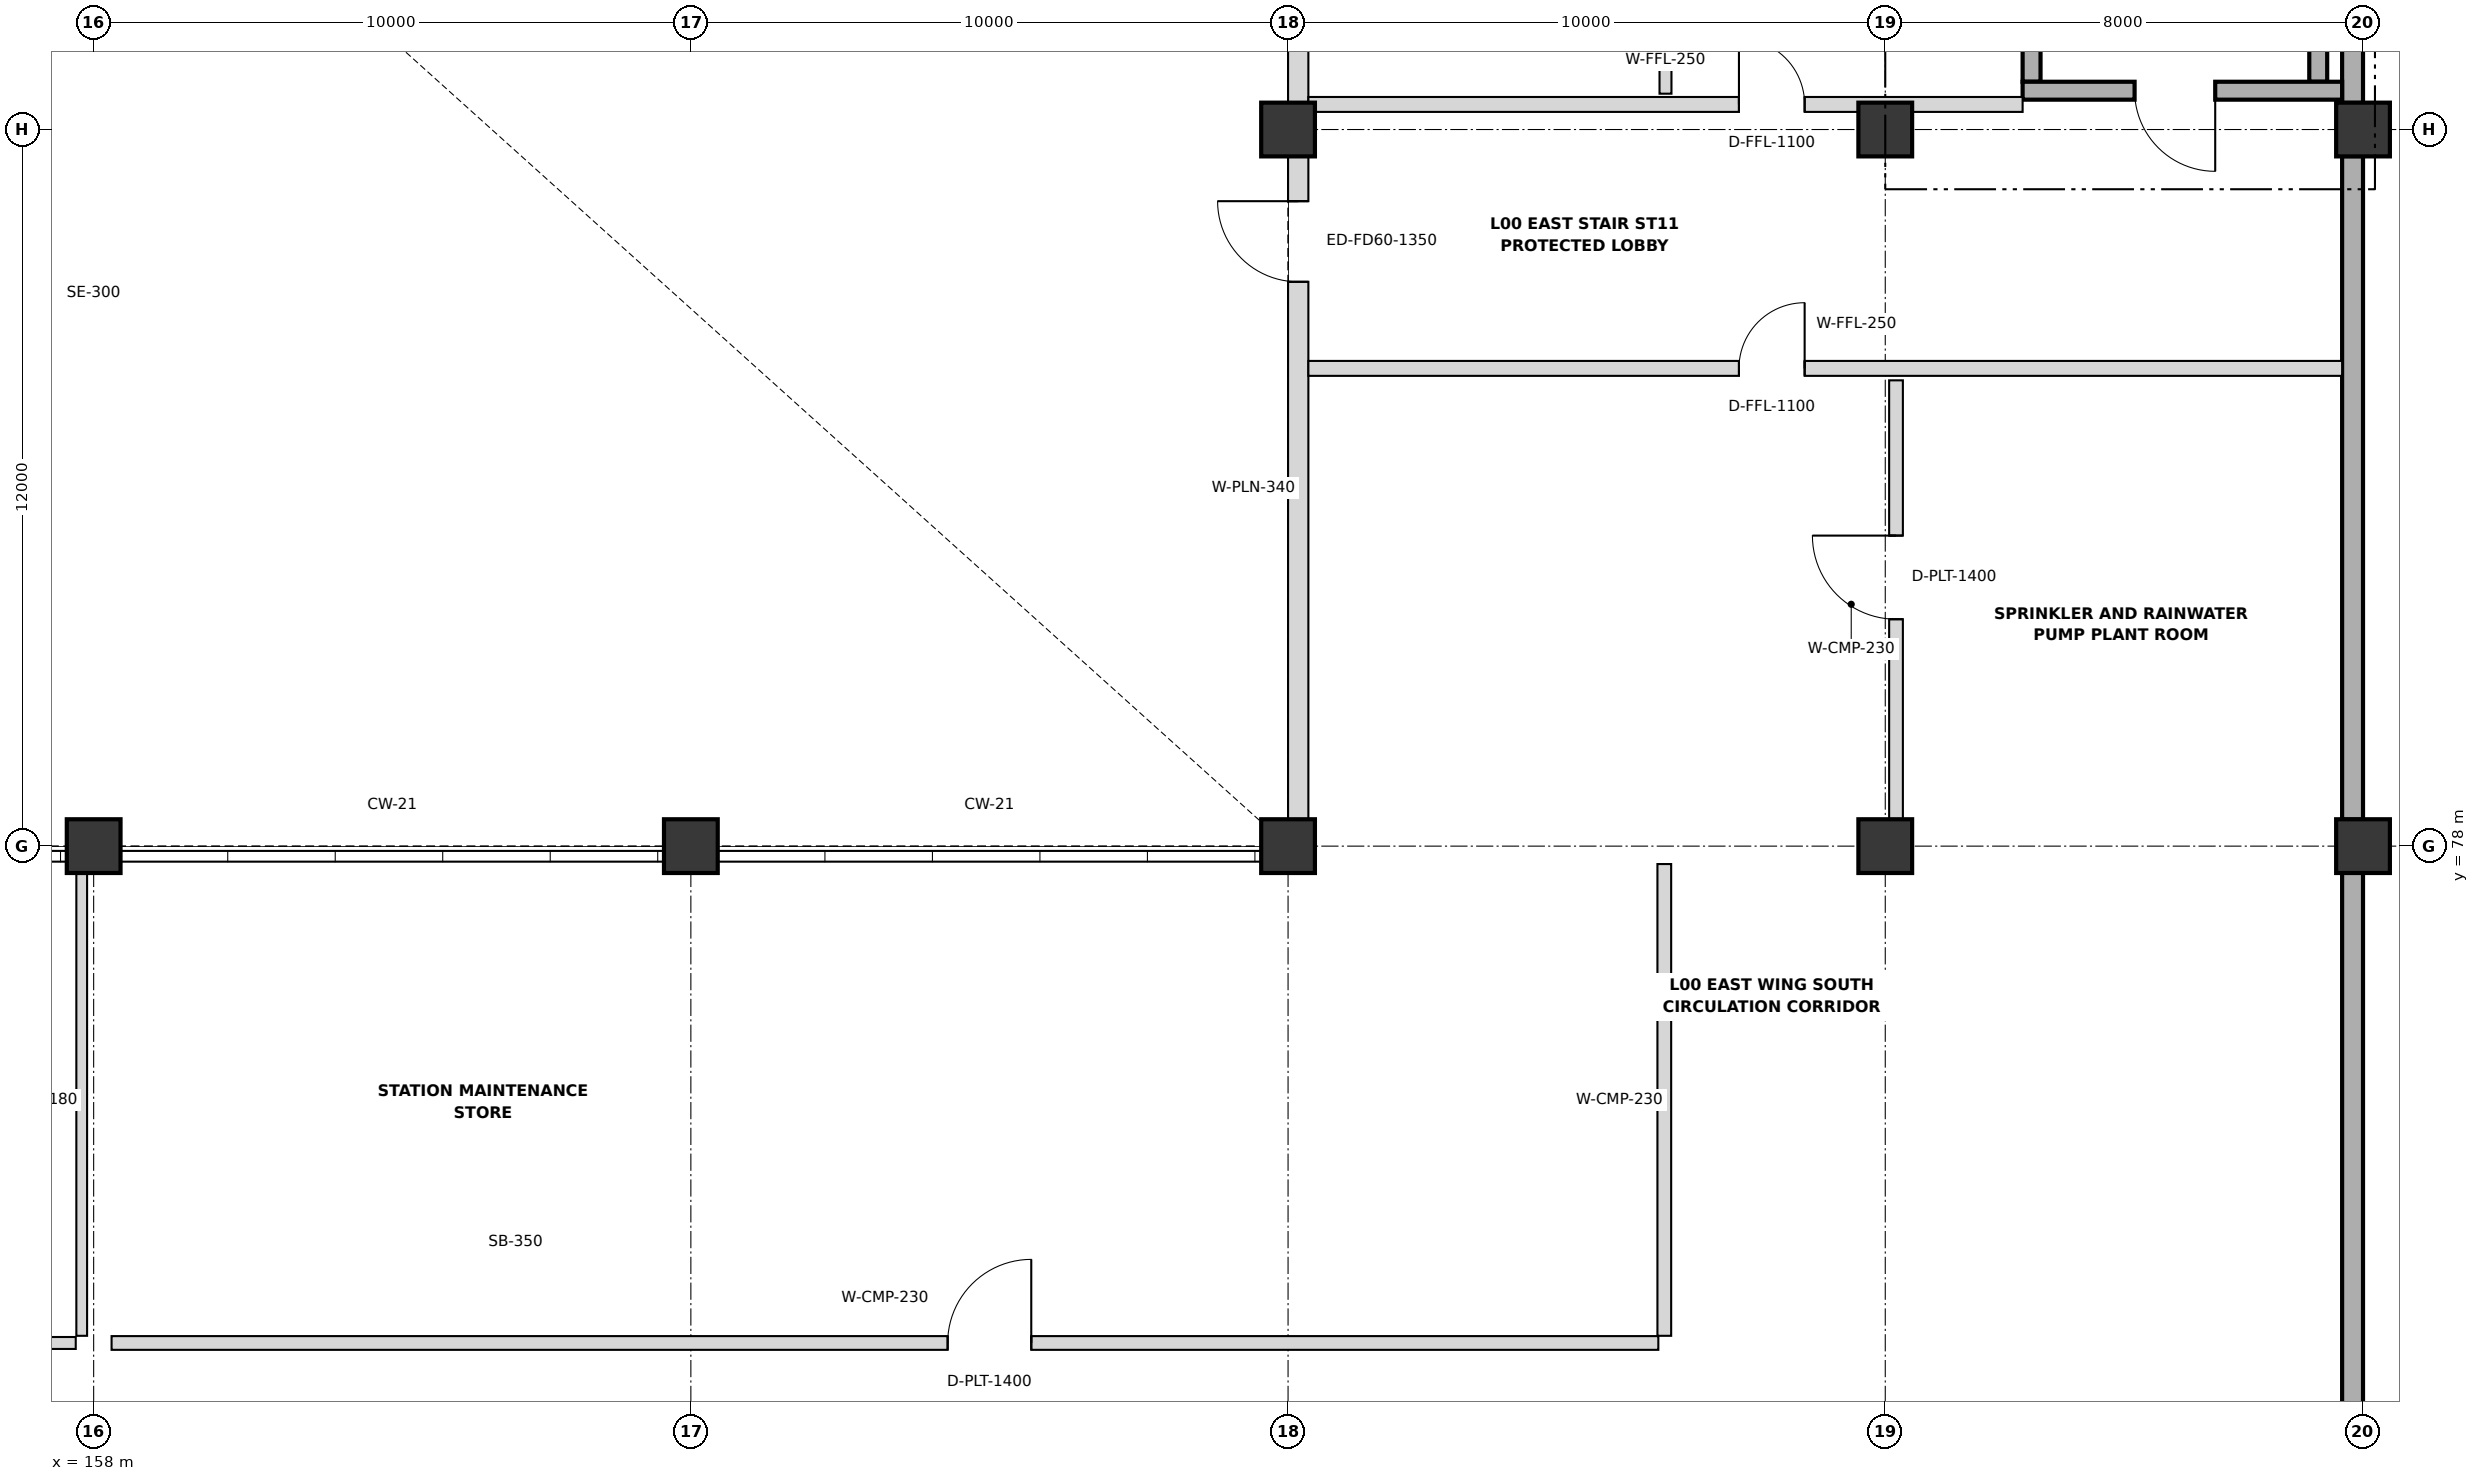
"""IFC4 building model, lengths in metres.
Left out: names, types, materials, properties, quantities, classifications, styles, units other than length and angle.
Written with IfcOpenShell. Run it as: python <this file> out.ifc"""

import sys

from ifc_helpers import new_model, si_unit, direction, frame, frame_2d, origin, origin_2d, place, context, subcontext, project, spatial, rectangle, extrude, element, fill, save


model = new_model("IFC4")
c1 = context("Model", 3, precision=1e-05, world=origin(), true_north=direction((0.0, 1.0)))
c2 = subcontext(c1, "Body", "Model", "MODEL_VIEW")
j1 = project(units=[si_unit("LENGTHUNIT", "METRE"), si_unit("PLANEANGLEUNIT", "RADIAN")], contexts=[c1])
p1 = place(None, origin())
s1 = spatial("IfcSite", under=j1, at=p1, CompositionType="ELEMENT")
p2 = place(p1, origin())
s2 = spatial("IfcBuilding", under=s1, at=p2, CompositionType="ELEMENT")
p3 = place(p2, origin())
s3 = spatial("IfcBuildingStorey", under=s2, at=p3, CompositionType="ELEMENT", Elevation=0.0)
for number, where, z_axis, x_axis in (
    (1, (158.0, 78.0, 0.0), (0.0, 0.0, 1.0), (1.0, 0.0, 0.0)),
    (2, (168.0, 78.0, 0.0), (0.0, 0.0, 1.0), (1.0, 0.0, 0.0)),
    (3, (178.0, 78.0, 0.0), (0.0, 0.0, 1.0), (1.0, 0.0, 0.0)),
    (4, (178.0, 90.0, 0.0), (0.0, 0.0, 1.0), (1.0, 0.0, 0.0)),
    (5, (188.0, 78.0, 0.0), (0.0, 0.0, 1.0), (1.0, 0.0, 0.0)),
    (6, (188.0, 90.0, 0.0), (0.0, 0.0, 1.0), (1.0, 0.0, 0.0)),
    (7, (196.0, 78.0, 0.0), (0.0, 0.0, 1.0), (1.0, 0.0, 0.0)),
    (8, (196.0, 90.0, 0.0), (0.0, 0.0, 1.0), (1.0, 0.0, 0.0)),
):
    element("IfcColumn", number, at=place(p3, frame(where, z_axis=z_axis, x_axis=x_axis)), inside=s3, PredefinedType="COLUMN", context=c2, shape_type="SweptSolid", body=[
        extrude(rectangle(XDim=0.9, YDim=0.9, at=origin_2d()), origin(), (0.0, 0.0, 1.0), 5.4),
    ])
for number, where, z_axis, x_axis in (
    (9, (195.825, 77.555, 0.0), (0.0, 0.0, 1.0), (0.0, -1.0, 0.0)),
    (10, (195.825, 89.555, 0.0), (0.0, 0.0, 1.0), (0.0, -1.0, 0.0)),
    (11, (195.825, 101.555, 0.0), (0.0, 0.0, 1.0), (0.0, -1.0, 0.0)),
):
    element("IfcWall", number, at=place(p3, frame(where, z_axis=z_axis, x_axis=x_axis)), inside=s3, PredefinedType="SOLIDWALL", context=c2, shape_type="SweptSolid", body=[
        extrude(rectangle(XDim=11.11, YDim=0.35, at=frame_2d((5.555, 0.0))), origin(), (0.0, 0.0, 1.0), 5.4),
    ])
p4 = place(p3, frame((178.17, 78.445, 0.0), z_axis=(0.0, 0.0, 1.0), x_axis=(0.0, 1.0, 0.0)))
e12 = element("IfcWall", 12, at=p4, inside=s3, PredefinedType="SOLIDWALL", context=c2, shape_type="SweptSolid", body=[
    extrude(rectangle(XDim=11.11, YDim=0.34, at=frame_2d((5.555, 0.0))), origin(), (0.0, 0.0, 1.0), 4.358),
])
p5 = place(p4, frame((9.005, 0.0, 0.0)))
e13 = element("IfcOpeningElement", 13, at=p5, cuts=e12, PredefinedType="OPENING", context=c2, shape_type="SweptSolid", body=[
    extrude(rectangle(XDim=1.35, YDim=2.2, at=frame_2d((0.675, 1.1))), frame((0.0, 0.18, 0.0), z_axis=(0.0, -1.0, 0.0), x_axis=(1.0, 0.0, 0.0)), (0.0, 0.0, 1.0), 0.36),
])
p6 = place(p3, frame((178.17, 90.445, 0.0), z_axis=(0.0, 0.0, 1.0), x_axis=(0.0, 1.0, 0.0)))
e14 = element("IfcWall", 14, at=p6, inside=s3, PredefinedType="SOLIDWALL", context=c2, shape_type="SweptSolid", body=[
    extrude(rectangle(XDim=11.11, YDim=0.34, at=frame_2d((5.555, 0.0))), origin(), (0.0, 0.0, 1.0), 4.358),
])
p7 = place(p6, frame((4.555, 0.0, 0.0)))
e15 = element("IfcOpeningElement", 15, at=p7, cuts=e14, PredefinedType="OPENING", context=c2, shape_type="SweptSolid", body=[
    extrude(rectangle(XDim=1.95, YDim=2.4, at=frame_2d((0.975, 1.2))), frame((0.0, 0.18, 0.0), z_axis=(0.0, -1.0, 0.0), x_axis=(1.0, 0.0, 0.0)), (0.0, 0.0, 1.0), 0.36),
])
for number, where, z_axis, x_axis in (
    (16, (190.45, 90.8, 0.0), (0.0, 0.0, 1.0), (0.0, 1.0, 0.0)),
    (17, (195.25, 99.4, 0.0), (0.0, 0.0, 1.0), (0.0, -1.0, 0.0)),
):
    element("IfcWall", number, at=place(p3, frame(where, z_axis=z_axis, x_axis=x_axis)), inside=s3, PredefinedType="SHEAR", context=c2, shape_type="SweptSolid", body=[
        extrude(rectangle(XDim=8.6, YDim=0.3, at=frame_2d((4.3, 0.0))), origin(), (0.0, 0.0, 1.0), 5.4),
    ])
p8 = place(p3, frame((195.65, 90.65, 0.0), z_axis=(0.0, 0.0, 1.0), x_axis=(-1.0, 0.0, 0.0)))
e18 = element("IfcWall", 18, at=p8, inside=s3, PredefinedType="SHEAR", context=c2, shape_type="SweptSolid", body=[
    extrude(rectangle(XDim=5.35, YDim=0.3, at=frame_2d((2.675, 0.0))), origin(), (0.0, 0.0, 1.0), 5.4),
])
p9 = place(p8, frame((2.125, 0.0, 0.0)))
e19 = element("IfcOpeningElement", 19, at=p9, cuts=e18, PredefinedType="OPENING", context=c2, shape_type="SweptSolid", body=[
    extrude(rectangle(XDim=1.35, YDim=2.15, at=frame_2d((0.675, 1.075))), frame((0.0, 0.16, 0.0), z_axis=(0.0, -1.0, 0.0), x_axis=(1.0, 0.0, 0.0)), (0.0, 0.0, 1.0), 0.32),
])
p10 = place(p3, frame((178.34, 90.42, 0.0), z_axis=(0.0, 0.0, 1.0), x_axis=(1.0, 0.0, 0.0)))
e20 = element("IfcWall", 20, at=p10, inside=s3, PredefinedType="PARTITIONING", context=c2, shape_type="SweptSolid", body=[
    extrude(rectangle(XDim=11.96, YDim=0.25, at=frame_2d((5.98, 0.0))), origin(), (0.0, 0.0, 1.0), 4.358),
])
p11 = place(p10, frame((7.21, 0.0, 0.0)))
e21 = element("IfcOpeningElement", 21, at=p11, cuts=e20, PredefinedType="OPENING", context=c2, shape_type="SweptSolid", body=[
    extrude(rectangle(XDim=1.1, YDim=2.15, at=frame_2d((0.55, 1.075))), frame((0.0, 0.135, 0.0), z_axis=(0.0, -1.0, 0.0), x_axis=(1.0, 0.0, 0.0)), (0.0, 0.0, 1.0), 0.27),
])
p12 = place(p3, frame((178.34, 86.0, 0.0), z_axis=(0.0, 0.0, 1.0), x_axis=(1.0, 0.0, 0.0)))
e22 = element("IfcWall", 22, at=p12, inside=s3, PredefinedType="PARTITIONING", context=c2, shape_type="SweptSolid", body=[
    extrude(rectangle(XDim=17.31, YDim=0.25, at=frame_2d((8.655, 0.0))), origin(), (0.0, 0.0, 1.0), 4.358),
])
p13 = place(p12, frame((7.21, 0.0, 0.0)))
e23 = element("IfcOpeningElement", 23, at=p13, cuts=e22, PredefinedType="OPENING", context=c2, shape_type="SweptSolid", body=[
    extrude(rectangle(XDim=1.1, YDim=2.15, at=frame_2d((0.55, 1.075))), frame((0.0, 0.135, 0.0), z_axis=(0.0, -1.0, 0.0), x_axis=(1.0, 0.0, 0.0)), (0.0, 0.0, 1.0), 0.27),
])
p14 = place(p3, frame((184.32, 90.6, 0.0), z_axis=(0.0, 0.0, 1.0), x_axis=(0.0, 1.0, 0.0)))
e24 = element("IfcWall", 24, at=p14, inside=s3, PredefinedType="PARTITIONING", context=c2, shape_type="SweptSolid", body=[
    extrude(rectangle(XDim=23.1, YDim=0.2, at=frame_2d((11.55, 0.0))), origin(), (0.0, 0.0, 1.0), 4.258),
])
p15 = place(p14, frame((10.875, 0.0, 0.0)))
e25 = element("IfcOpeningElement", 25, at=p15, cuts=e24, PredefinedType="OPENING", context=c2, shape_type="SweptSolid", body=[
    extrude(rectangle(XDim=1.05, YDim=2.2, at=frame_2d((0.525, 1.1))), frame((0.0, 0.11, 0.0), z_axis=(0.0, -1.0, 0.0), x_axis=(1.0, 0.0, 0.0)), (0.0, 0.0, 1.0), 0.22),
])
p16 = place(p3, frame((188.18, 78.3, 0.0), z_axis=(0.0, 0.0, 1.0), x_axis=(0.0, 1.0, 0.0)))
e26 = element("IfcWall", 26, at=p16, inside=s3, PredefinedType="PARTITIONING", context=c2, shape_type="SweptSolid", body=[
    extrude(rectangle(XDim=7.5, YDim=0.23, at=frame_2d((3.75, 0.0))), origin(), (0.0, 0.0, 1.0), 4.258),
])
p17 = place(p16, frame((3.5, 0.0, 0.0)))
e27 = element("IfcOpeningElement", 27, at=p17, cuts=e26, PredefinedType="OPENING", context=c2, shape_type="SweptSolid", body=[
    extrude(rectangle(XDim=1.4, YDim=2.2, at=frame_2d((0.7, 1.1))), frame((0.0, 0.125, 0.0), z_axis=(0.0, -1.0, 0.0), x_axis=(1.0, 0.0, 0.0)), (0.0, 0.0, 1.0), 0.25),
])
p18 = place(p3, frame((131.8, 69.68, 0.0), z_axis=(0.0, 0.0, 1.0), x_axis=(1.0, 0.0, 0.0)))
e28 = element("IfcWall", 28, at=p18, inside=s3, PredefinedType="PARTITIONING", context=c2, shape_type="SweptSolid", body=[
    extrude(rectangle(XDim=25.9, YDim=0.2, at=frame_2d((12.95, 0.0))), origin(), (0.0, 0.0, 1.0), 4.358),
])
p19 = place(p18, frame((10.75, 0.0, 0.0)))
e29 = element("IfcOpeningElement", 29, at=p19, cuts=e28, PredefinedType="OPENING", context=c2, shape_type="SweptSolid", body=[
    extrude(rectangle(XDim=0.9, YDim=2.1, at=frame_2d((0.45, 1.05))), frame((0.0, 0.11, 0.0), z_axis=(0.0, -1.0, 0.0), x_axis=(1.0, 0.0, 0.0)), (0.0, 0.0, 1.0), 0.22),
])
p20 = place(p3, frame((157.8, 69.8, 0.0), z_axis=(0.0, 0.0, 1.0), x_axis=(0.0, 1.0, 0.0)))
e30 = element("IfcWall", 30, at=p20, inside=s3, PredefinedType="PARTITIONING", context=c2, shape_type="SweptSolid", body=[
    extrude(rectangle(XDim=7.9, YDim=0.18, at=frame_2d((3.95, 0.0))), origin(), (0.0, 0.0, 1.0), 4.258),
])
p21 = place(p3, frame((158.3, 69.68, 0.0), z_axis=(0.0, 0.0, 1.0), x_axis=(1.0, 0.0, 0.0)))
e31 = element("IfcWall", 31, at=p21, inside=s3, PredefinedType="PARTITIONING", context=c2, shape_type="SweptSolid", body=[
    extrude(rectangle(XDim=25.9, YDim=0.23, at=frame_2d((12.95, 0.0))), origin(), (0.0, 0.0, 1.0), 4.358),
])
p22 = place(p21, frame((14.0, 0.0, 0.0)))
e32 = element("IfcOpeningElement", 32, at=p22, cuts=e31, PredefinedType="OPENING", context=c2, shape_type="SweptSolid", body=[
    extrude(rectangle(XDim=1.4, YDim=2.2, at=frame_2d((0.7, 1.1))), frame((0.0, 0.125, 0.0), z_axis=(0.0, -1.0, 0.0), x_axis=(1.0, 0.0, 0.0)), (0.0, 0.0, 1.0), 0.25),
])
p23 = place(p3, frame((184.3, 69.8, 0.0), z_axis=(0.0, 0.0, 1.0), x_axis=(0.0, 1.0, 0.0)))
e33 = element("IfcWall", 33, at=p23, inside=s3, PredefinedType="PARTITIONING", context=c2, shape_type="SweptSolid", body=[
    extrude(rectangle(XDim=7.9, YDim=0.23, at=frame_2d((3.95, 0.0))), origin(), (0.0, 0.0, 1.0), 4.258),
])
p24 = place(p5, origin())
e34 = element("IfcDoor", 34, at=p24, inside=s3, OperationType="SINGLE_SWING_RIGHT", PredefinedType="DOOR", context=c2, shape_type="SweptSolid", body=[
    extrude(rectangle(XDim=1.35, YDim=2.2, at=frame_2d((0.675, 1.1))), frame((0.0, 0.025, 0.0), z_axis=(0.0, -1.0, 0.0), x_axis=(1.0, 0.0, 0.0)), (0.0, 0.0, 1.0), 0.05),
])
fill(e13, e34)
p25 = place(p9, origin())
e35 = element("IfcDoor", 35, at=p25, inside=s3, OperationType="SINGLE_SWING_LEFT", PredefinedType="DOOR", context=c2, shape_type="SweptSolid", body=[
    extrude(rectangle(XDim=1.35, YDim=2.15, at=frame_2d((0.675, 1.075))), frame((0.0, 0.025, 0.0), z_axis=(0.0, -1.0, 0.0), x_axis=(1.0, 0.0, 0.0)), (0.0, 0.0, 1.0), 0.05),
])
fill(e19, e35)
p26 = place(p11, origin())
e36 = element("IfcDoor", 36, at=p26, inside=s3, OperationType="SINGLE_SWING_LEFT", PredefinedType="DOOR", context=c2, shape_type="SweptSolid", body=[
    extrude(rectangle(XDim=1.1, YDim=2.15, at=frame_2d((0.55, 1.075))), frame((0.0, 0.025, 0.0), z_axis=(0.0, -1.0, 0.0), x_axis=(1.0, 0.0, 0.0)), (0.0, 0.0, 1.0), 0.05),
])
fill(e21, e36)
p27 = place(p13, origin())
e37 = element("IfcDoor", 37, at=p27, inside=s3, OperationType="SINGLE_SWING_RIGHT", PredefinedType="DOOR", context=c2, shape_type="SweptSolid", body=[
    extrude(rectangle(XDim=1.1, YDim=2.15, at=frame_2d((0.55, 1.075))), frame((0.0, 0.025, 0.0), z_axis=(0.0, -1.0, 0.0), x_axis=(1.0, 0.0, 0.0)), (0.0, 0.0, 1.0), 0.05),
])
fill(e23, e37)
p28 = place(p17, origin())
e38 = element("IfcDoor", 38, at=p28, inside=s3, OperationType="SINGLE_SWING_RIGHT", PredefinedType="DOOR", context=c2, shape_type="SweptSolid", body=[
    extrude(rectangle(XDim=1.4, YDim=2.2, at=frame_2d((0.7, 1.1))), frame((0.0, 0.025, 0.0), z_axis=(0.0, -1.0, 0.0), x_axis=(1.0, 0.0, 0.0)), (0.0, 0.0, 1.0), 0.05),
])
fill(e27, e38)
p29 = place(p22, origin())
e39 = element("IfcDoor", 39, at=p29, inside=s3, OperationType="SINGLE_SWING_RIGHT", PredefinedType="DOOR", context=c2, shape_type="SweptSolid", body=[
    extrude(rectangle(XDim=1.4, YDim=2.2, at=frame_2d((0.7, 1.1))), frame((0.0, 0.025, 0.0), z_axis=(0.0, -1.0, 0.0), x_axis=(1.0, 0.0, 0.0)), (0.0, 0.0, 1.0), 0.05),
])
fill(e32, e39)
save(model, sys.argv[1])
